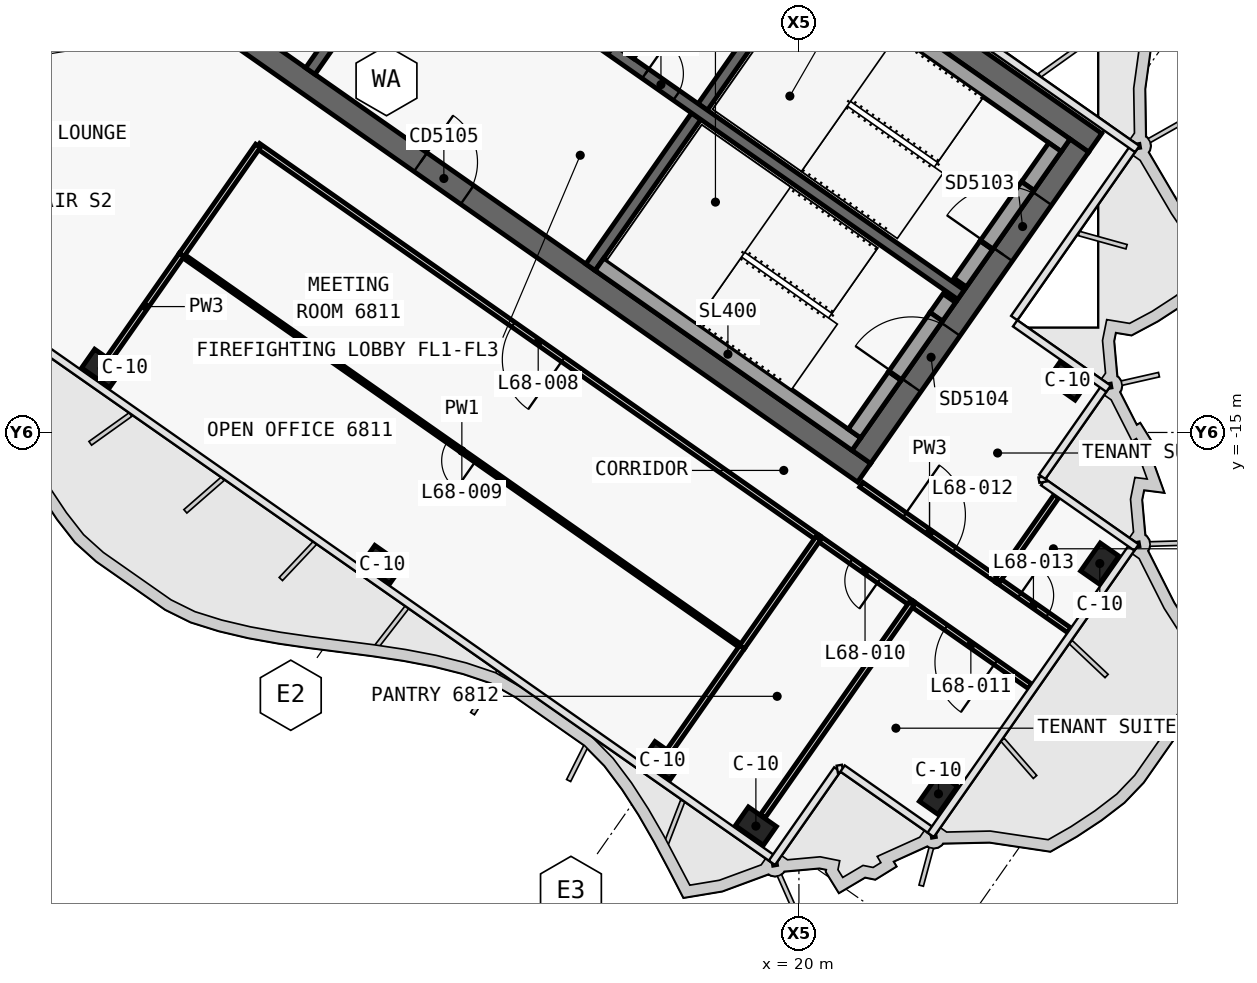
"""IFC4 building model, lengths in metres.
Left out: names, types, materials, properties, quantities, classifications, styles, units other than length and angle.
Written with IfcOpenShell. Run it as: python <this file> out.ifc"""

import sys

from ifc_helpers import new_model, si_unit, direction, frame, frame_2d, origin, origin_2d, place, context, subcontext, project, spatial, polyline, rectangle, outline, extrude, element, fill, save


model = new_model("IFC4")
c1 = context("Model", 3, precision=1e-05, world=origin(), true_north=direction((0.0, 1.0)))
c2 = subcontext(c1, "Body", "Model", "MODEL_VIEW")
j1 = project(units=[si_unit("LENGTHUNIT", "METRE"), si_unit("PLANEANGLEUNIT", "RADIAN")], contexts=[c1])
p1 = place(None, origin())
s1 = spatial("IfcSite", under=j1, at=p1, CompositionType="ELEMENT")
p2 = place(p1, origin())
s2 = spatial("IfcBuilding", under=s1, at=p2, CompositionType="ELEMENT")
p3 = place(p2, frame((0.0, 0.0, 287.8)))
s3 = spatial("IfcBuildingStorey", under=s2, at=p3, CompositionType="ELEMENT", Elevation=287.8)
p4 = place(p3, frame((0.028, 12.066, 0.0), z_axis=(0.0, 0.0, 1.0), x_axis=(0.819151382952, -0.573577380837, 0.0)))
e1 = element("IfcWall", 1, at=p4, inside=s3, PredefinedType="SHEAR", context=c2, shape_type="SweptSolid", body=[
    extrude(outline(polyline([(33.898, 0.3), (0.0, 0.3), (0.42, -0.3), (33.898, -0.3), (33.898, 0.3)])), origin(), (0.0, 0.0, 1.0), 3.9),
])
p5 = place(p3, frame((0.028, -0.874, 0.0), z_axis=(0.0, 0.0, 1.0), x_axis=(0.819150035022, -0.573579305871, 0.0)))
e2 = element("IfcWall", 2, at=p5, inside=s3, PredefinedType="SHEAR", context=c2, shape_type="SweptSolid", body=[
    extrude(outline(polyline([(26.476, 0.3), (0.0, 0.3), (0.42, -0.3), (26.476, -0.3), (26.476, 0.3)])), origin(), (0.0, 0.0, 1.0), 3.9),
])
p6 = place(p5, frame((1.026, 0.0, 0.0)))
e3 = element("IfcOpeningElement", 3, at=p6, cuts=e2, PredefinedType="OPENING", context=c2, shape_type="SweptSolid", body=[
    extrude(rectangle(XDim=1.5, YDim=2.1, at=frame_2d((0.75, 1.05))), frame((0.0, 0.31, 0.0), z_axis=(0.0, -1.0, 0.0), x_axis=(1.0, 0.0, 0.0)), (0.0, 0.0, 1.0), 0.62),
])
p7 = place(p5, frame((12.226, 0.0, 0.0)))
e4 = element("IfcOpeningElement", 4, at=p7, cuts=e2, PredefinedType="OPENING", context=c2, shape_type="SweptSolid", body=[
    extrude(rectangle(XDim=1.5, YDim=2.1, at=frame_2d((0.75, 1.05))), frame((0.0, 0.31, 0.0), z_axis=(0.0, -1.0, 0.0), x_axis=(1.0, 0.0, 0.0)), (0.0, 0.0, 1.0), 0.62),
])
p8 = place(p3, frame((21.642, -15.642, 0.0), z_axis=(0.0, 0.0, 1.0), x_axis=(0.573586866468, 0.819144740944, 0.0)))
e5 = element("IfcWall", 5, at=p8, inside=s3, PredefinedType="SHEAR", context=c2, shape_type="SweptSolid", body=[
    extrude(outline(polyline([(10.0, 0.3), (0.0, 0.3), (0.0, -0.3), (10.0, -0.3), (10.0, 0.3)])), origin(), (0.0, 0.0, 1.0), 3.9),
])
p9 = place(p8, frame((6.5, 0.0, 0.0)))
e6 = element("IfcOpeningElement", 6, at=p9, cuts=e5, PredefinedType="OPENING", context=c2, shape_type="SweptSolid", body=[
    extrude(rectangle(XDim=1.8, YDim=2.1, at=frame_2d((0.9, 1.05))), frame((0.0, 0.31, 0.0), z_axis=(0.0, -1.0, 0.0), x_axis=(1.0, 0.0, 0.0)), (0.0, 0.0, 1.0), 0.62),
])
p10 = place(p8, frame((2.3, 0.0, 0.0)))
e7 = element("IfcOpeningElement", 7, at=p10, cuts=e5, PredefinedType="OPENING", context=c2, shape_type="SweptSolid", body=[
    extrude(rectangle(XDim=1.8, YDim=2.1, at=frame_2d((0.9, 1.05))), frame((0.0, 0.31, 0.0), z_axis=(0.0, -1.0, 0.0), x_axis=(1.0, 0.0, 0.0)), (0.0, 0.0, 1.0), 0.62),
])
p11 = place(p3, frame((7.143, -5.49, 0.0), z_axis=(0.0, 0.0, 1.0), x_axis=(0.573617744349, 0.819123118565, 0.0)))
e8 = element("IfcWall", 8, at=p11, inside=s3, PredefinedType="SHEAR", context=c2, shape_type="SweptSolid", body=[
    extrude(outline(polyline([(0.0, 0.15), (0.0, -0.15), (4.85, -0.15), (4.85, 0.15), (0.0, 0.15)])), origin(), (0.0, 0.0, 1.0), 3.9),
])
p12 = place(p3, frame((14.515, -10.652, 0.0), z_axis=(0.0, 0.0, 1.0), x_axis=(0.573560315113, 0.819163332265, 0.0)))
e9 = element("IfcWall", 9, at=p12, inside=s3, PredefinedType="SHEAR", context=c2, shape_type="SweptSolid", body=[
    extrude(outline(polyline([(0.0, 0.15), (0.0, -0.15), (4.85, -0.15), (4.85, 0.15), (0.0, 0.15)])), origin(), (0.0, 0.0, 1.0), 3.9),
])
p13 = place(p3, frame((17.469, -6.433, 0.0), z_axis=(0.0, 0.0, 1.0), x_axis=(0.573594092424, 0.81913968109, 0.0)))
e10 = element("IfcWall", 10, at=p13, inside=s3, PredefinedType="SHEAR", context=c2, shape_type="SweptSolid", body=[
    extrude(outline(polyline([(4.85, -0.15), (4.85, 0.15), (0.0, 0.15), (0.0, -0.15), (4.85, -0.15)])), origin(), (0.0, 0.0, 1.0), 3.9),
])
p14 = place(p3, frame((2.638, 3.768, 0.0), z_axis=(0.0, 0.0, 1.0), x_axis=(0.819155014212, -0.573572194837, 0.0)))
e11 = element("IfcWall", 11, at=p14, inside=s3, PredefinedType="SHEAR", context=c2, shape_type="SweptSolid", body=[
    extrude(outline(polyline([(0.0, 0.15), (0.0, -0.15), (26.4, -0.15), (26.4, 0.15), (0.0, 0.15)])), origin(), (0.0, 0.0, 1.0), 3.9),
])
p15 = place(p14, frame((9.637, 0.0, 0.0)))
e12 = element("IfcOpeningElement", 12, at=p15, cuts=e11, PredefinedType="OPENING", context=c2, shape_type="SweptSolid", body=[
    extrude(rectangle(XDim=1.2, YDim=2.1, at=frame_2d((0.6, 1.05))), frame((0.0, 0.16, 0.0), z_axis=(0.0, -1.0, 0.0), x_axis=(1.0, 0.0, 0.0)), (0.0, 0.0, 1.0), 0.32),
])
p16 = place(p14, frame((11.812, 0.0, 0.0)))
e13 = element("IfcOpeningElement", 13, at=p16, cuts=e11, PredefinedType="OPENING", context=c2, shape_type="SweptSolid", body=[
    extrude(rectangle(XDim=1.2, YDim=2.1, at=frame_2d((0.6, 1.05))), frame((0.0, 0.16, 0.0), z_axis=(0.0, -1.0, 0.0), x_axis=(1.0, 0.0, 0.0)), (0.0, 0.0, 1.0), 0.32),
])
p17 = place(p14, frame((13.988, 0.0, 0.0)))
e14 = element("IfcOpeningElement", 14, at=p17, cuts=e11, PredefinedType="OPENING", context=c2, shape_type="SweptSolid", body=[
    extrude(rectangle(XDim=1.2, YDim=2.1, at=frame_2d((0.6, 1.05))), frame((0.0, 0.16, 0.0), z_axis=(0.0, -1.0, 0.0), x_axis=(1.0, 0.0, 0.0)), (0.0, 0.0, 1.0), 0.32),
])
p18 = place(p14, frame((16.262, 0.0, 0.0)))
e15 = element("IfcOpeningElement", 15, at=p18, cuts=e11, PredefinedType="OPENING", context=c2, shape_type="SweptSolid", body=[
    extrude(rectangle(XDim=1.0, YDim=2.1, at=frame_2d((0.5, 1.05))), frame((0.0, 0.16, 0.0), z_axis=(0.0, -1.0, 0.0), x_axis=(1.0, 0.0, 0.0)), (0.0, 0.0, 1.0), 0.32),
])
for number, where, z_axis, x_axis in (
    (16, (1.665, -13.313, 0.0), (0.0, 0.0, 1.0), (0.819, -0.574, 0.0)),
    (17, (9.038, -18.475, 0.0), (0.0, 0.0, 1.0), (0.819, -0.574, 0.0)),
    (18, (16.41, -23.637, 0.0), (0.0, 0.0, 1.0), (0.819, -0.574, 0.0)),
    (19, (18.867, -25.358, 0.0), (0.0, 0.0, 1.0), (0.819, -0.574, 0.0)),
    (20, (27.07, -13.644, 0.0), (0.0, 0.0, 1.0), (0.819, -0.574, 0.0)),
    (21, (23.672, -24.51, 0.0), (0.0, 0.0, 1.0), (0.574, 0.819, 0.0)),
    (22, (27.917, -18.449, 0.0), (0.0, 0.0, 1.0), (0.574, 0.819, 0.0)),
):
    element("IfcColumn", number, at=place(p3, frame(where, z_axis=z_axis, x_axis=x_axis)), inside=s3, PredefinedType="COLUMN", context=c2, shape_type="SweptSolid", body=[
        extrude(rectangle(XDim=0.9, YDim=0.6, at=origin_2d()), origin(), (0.0, 0.0, 1.0), 3.9),
    ])
p19 = place(p3, frame((15.565, -5.1, 0.0), z_axis=(0.0, 0.0, 1.0), x_axis=(0.573560315113, 0.819163332265, 0.0)))
e23 = element("IfcWall", 23, at=p19, inside=s3, PredefinedType="SOLIDWALL", context=c2, shape_type="SweptSolid", body=[
    extrude(rectangle(XDim=4.85, YDim=0.2, at=frame_2d((2.425, 0.0))), origin(), (0.0, 0.0, 1.0), 3.9),
])
p20 = place(p3, frame((20.259, -2.71, 0.0), z_axis=(0.0, 0.0, 1.0), x_axis=(0.81914849389, -0.573581506813, 0.0)))
e24 = element("IfcWall", 24, at=p20, inside=s3, PredefinedType="SOLIDWALL", context=c2, shape_type="SweptSolid", body=[
    extrude(rectangle(XDim=8.25, YDim=0.4, at=frame_2d((4.125, 0.0))), origin(), (0.0, 0.0, 1.0), 3.62),
])
p21 = place(p3, frame((24.244, -11.055, 0.0), z_axis=(0.0, 0.0, 1.0), x_axis=(0.573571582932, 0.819155442668, 0.0)))
e25 = element("IfcWall", 25, at=p21, inside=s3, PredefinedType="SOLIDWALL", context=c2, shape_type="SweptSolid", body=[
    extrude(rectangle(XDim=1.2, YDim=0.4, at=frame_2d((0.6, 0.0))), origin(), (0.0, 0.0, 1.0), 3.62),
])
p22 = place(p3, frame((26.022, -8.515, 0.0), z_axis=(0.0, 0.0, 1.0), x_axis=(0.573619628835, 0.819121798889, 0.0)))
e26 = element("IfcWall", 26, at=p22, inside=s3, PredefinedType="SOLIDWALL", context=c2, shape_type="SweptSolid", body=[
    extrude(rectangle(XDim=1.25, YDim=0.4, at=frame_2d((0.625, 0.0))), origin(), (0.0, 0.0, 1.0), 3.62),
])
p23 = place(p3, frame((24.932, -10.072, 2.15), z_axis=(0.0, 0.0, 1.0), x_axis=(0.573591692345, 0.819141361715, 0.0)))
e27 = element("IfcWall", 27, at=p23, inside=s3, PredefinedType="SOLIDWALL", context=c2, shape_type="SweptSolid", body=[
    extrude(rectangle(XDim=1.9, YDim=0.4, at=frame_2d((0.95, 0.0))), origin(), (0.0, 0.0, 1.0), 1.47),
])
p24 = place(p3, frame((14.753, -10.574, 0.0), z_axis=(0.0, 0.0, 1.0), x_axis=(0.819158229677, -0.573567602601, 0.0)))
e28 = element("IfcWall", 28, at=p24, inside=s3, PredefinedType="SOLIDWALL", context=c2, shape_type="SweptSolid", body=[
    extrude(rectangle(XDim=8.25, YDim=0.4, at=frame_2d((4.125, 0.0))), origin(), (0.0, 0.0, 1.0), 3.62),
])
p25 = place(p3, frame((21.462, -15.028, 0.0), z_axis=(0.0, 0.0, 1.0), x_axis=(0.573559770908, 0.819163713305, 0.0)))
e29 = element("IfcWall", 29, at=p25, inside=s3, PredefinedType="SOLIDWALL", context=c2, shape_type="SweptSolid", body=[
    extrude(rectangle(XDim=1.85, YDim=0.4, at=frame_2d((0.925, 0.0))), origin(), (0.0, 0.0, 1.0), 3.62),
])
p26 = place(p3, frame((23.613, -11.956, 0.0), z_axis=(0.0, 0.0, 1.0), x_axis=(0.573435029941, 0.819251039936, 0.0)))
e30 = element("IfcWall", 30, at=p26, inside=s3, PredefinedType="SOLIDWALL", context=c2, shape_type="SweptSolid", body=[
    extrude(rectangle(XDim=0.6, YDim=0.4, at=frame_2d((0.3, 0.0))), origin(), (0.0, 0.0, 1.0), 3.62),
])
p27 = place(p3, frame((22.523, -13.512, 2.15), z_axis=(0.0, 0.0, 1.0), x_axis=(0.573591692345, 0.819141361715, 0.0)))
e31 = element("IfcWall", 31, at=p27, inside=s3, PredefinedType="SOLIDWALL", context=c2, shape_type="SweptSolid", body=[
    extrude(rectangle(XDim=1.9, YDim=0.4, at=frame_2d((0.95, 0.0))), origin(), (0.0, 0.0, 1.0), 1.47),
])
p28 = place(p3, frame((21.642, -16.375, 0.0), z_axis=(0.0, 0.0, 1.0), x_axis=(0.819156008334, -0.573570775066, 0.0)))
e32 = element("IfcWall", 32, at=p28, inside=s3, PredefinedType="PARTITIONING", context=c2, shape_type="SweptSolid", body=[
    extrude(rectangle(XDim=4.382, YDim=0.15, at=frame_2d((2.191, 0.0))), origin(), (0.0, 0.0, 1.0), 3.05),
])
p29 = place(p28, frame((1.391, 0.0, 0.0)))
e33 = element("IfcOpeningElement", 33, at=p29, cuts=e32, PredefinedType="OPENING", context=c2, shape_type="SweptSolid", body=[
    extrude(rectangle(XDim=1.6, YDim=2.1, at=frame_2d((0.8, 1.05))), frame((0.0, 0.085, 0.0), z_axis=(0.0, -1.0, 0.0), x_axis=(1.0, 0.0, 0.0)), (0.0, 0.0, 1.0), 0.17),
])
p30 = place(p3, frame((25.228, -18.886, 0.0), z_axis=(0.0, 0.0, 1.0), x_axis=(0.819172126429, -0.573547755014, 0.0)))
e34 = element("IfcWall", 34, at=p30, inside=s3, PredefinedType="PARTITIONING", context=c2, shape_type="SweptSolid", body=[
    extrude(rectangle(XDim=2.302, YDim=0.15, at=frame_2d((1.151, 0.0))), origin(), (0.0, 0.0, 1.0), 3.0),
])
p31 = place(p30, frame((0.701, 0.0, 0.0)))
e35 = element("IfcOpeningElement", 35, at=p31, cuts=e34, PredefinedType="OPENING", context=c2, shape_type="SweptSolid", body=[
    extrude(rectangle(XDim=0.9, YDim=2.1, at=frame_2d((0.45, 1.05))), frame((0.0, 0.085, 0.0), z_axis=(0.0, -1.0, 0.0), x_axis=(1.0, 0.0, 0.0)), (0.0, 0.0, 1.0), 0.17),
])
p32 = place(p3, frame((20.513, -17.781, 0.0), z_axis=(0.0, 0.0, 1.0), x_axis=(-0.819153544995, 0.573574293115, 0.0)))
e36 = element("IfcWall", 36, at=p32, inside=s3, PredefinedType="PARTITIONING", context=c2, shape_type="SweptSolid", body=[
    extrude(rectangle(XDim=18.002, YDim=0.15, at=frame_2d((9.001, 0.0))), origin(), (0.0, 0.0, 1.0), 3.05),
])
p33 = place(p32, frame((8.201, 0.0, 0.0)))
e37 = element("IfcOpeningElement", 37, at=p33, cuts=e36, PredefinedType="OPENING", context=c2, shape_type="SweptSolid", body=[
    extrude(rectangle(XDim=1.6, YDim=2.1, at=frame_2d((0.8, 1.05))), frame((0.0, 0.085, 0.0), z_axis=(0.0, -1.0, 0.0), x_axis=(1.0, 0.0, 0.0)), (0.0, 0.0, 1.0), 0.17),
])
p34 = place(p3, frame((22.97, -19.502, 0.0), z_axis=(0.0, 0.0, 1.0), x_axis=(-0.819128818764, 0.573609604409, 0.0)))
e38 = element("IfcWall", 38, at=p34, inside=s3, PredefinedType="PARTITIONING", context=c2, shape_type="SweptSolid", body=[
    extrude(rectangle(XDim=3.004, YDim=0.15, at=frame_2d((1.502, 0.0))), origin(), (0.0, 0.0, 1.0), 3.05),
])
p35 = place(p34, frame((1.052, 0.0, 0.0)))
e39 = element("IfcOpeningElement", 39, at=p35, cuts=e38, PredefinedType="OPENING", context=c2, shape_type="SweptSolid", body=[
    extrude(rectangle(XDim=0.9, YDim=2.1, at=frame_2d((0.45, 1.05))), frame((0.0, 0.085, 0.0), z_axis=(0.0, -1.0, 0.0), x_axis=(1.0, 0.0, 0.0)), (0.0, 0.0, 1.0), 0.17),
])
p36 = place(p3, frame((26.081, -21.68, 0.0), z_axis=(0.0, 0.0, 1.0), x_axis=(-0.819168564183, 0.573552842775, 0.0)))
e40 = element("IfcWall", 40, at=p36, inside=s3, PredefinedType="PARTITIONING", context=c2, shape_type="SweptSolid", body=[
    extrude(rectangle(XDim=3.802, YDim=0.15, at=frame_2d((1.901, 0.0))), origin(), (0.0, 0.0, 1.0), 3.0),
])
p37 = place(p36, frame((1.101, 0.0, 0.0)))
e41 = element("IfcOpeningElement", 41, at=p37, cuts=e40, PredefinedType="OPENING", context=c2, shape_type="SweptSolid", body=[
    extrude(rectangle(XDim=1.6, YDim=2.1, at=frame_2d((0.8, 1.05))), frame((0.0, 0.085, 0.0), z_axis=(0.0, -1.0, 0.0), x_axis=(1.0, 0.0, 0.0)), (0.0, 0.0, 1.0), 0.17),
])
p38 = place(p3, frame((26.778, -16.675, 0.0), z_axis=(0.0, 0.0, 1.0), x_axis=(-0.573565509231, -0.819159695432, 0.0)))
e42 = element("IfcWall", 42, at=p38, inside=s3, PredefinedType="PARTITIONING", context=c2, shape_type="SweptSolid", body=[
    extrude(rectangle(XDim=2.7, YDim=0.15, at=frame_2d((1.35, 0.0))), origin(), (0.0, 0.0, 1.0), 3.62),
])
p39 = place(p3, frame((18.503, -20.648, 0.0), z_axis=(0.0, 0.0, 1.0), x_axis=(-0.819154173185, 0.573573395961, 0.0)))
e43 = element("IfcWall", 43, at=p39, inside=s3, PredefinedType="PARTITIONING", context=c2, shape_type="SweptSolid", body=[
    extrude(rectangle(XDim=18.0, YDim=0.1, at=frame_2d((9.0, 0.0))), origin(), (0.0, 0.0, 1.0), 3.05),
])
p40 = place(p39, frame((8.55, 0.0, 0.0)))
e44 = element("IfcOpeningElement", 44, at=p40, cuts=e43, PredefinedType="OPENING", context=c2, shape_type="SweptSolid", body=[
    extrude(rectangle(XDim=0.9, YDim=2.1, at=frame_2d((0.45, 1.05))), frame((0.0, 0.06, 0.0), z_axis=(0.0, -1.0, 0.0), x_axis=(1.0, 0.0, 0.0)), (0.0, 0.0, 1.0), 0.12),
])
p41 = place(p3, frame((18.503, -20.648, 0.0), z_axis=(0.0, 0.0, 1.0), x_axis=(-0.573560777794, -0.819163008306, 0.0)))
e45 = element("IfcWall", 45, at=p41, inside=s3, PredefinedType="PARTITIONING", context=c2, shape_type="SweptSolid", body=[
    extrude(rectangle(XDim=3.329, YDim=0.15, at=frame_2d((1.665, 0.0))), origin(), (0.0, 0.0, 1.0), 3.05),
])
p42 = place(p3, frame((1.849, -13.051, 0.0), z_axis=(0.0, 0.0, 1.0), x_axis=(0.573595235521, 0.819138880647, 0.0)))
e46 = element("IfcWall", 46, at=p42, inside=s3, PredefinedType="PARTITIONING", context=c2, shape_type="SweptSolid", body=[
    extrude(rectangle(XDim=3.329, YDim=0.15, at=frame_2d((1.665, 0.0))), origin(), (0.0, 0.0, 1.0), 3.05),
])
p43 = place(p3, frame((20.511, -17.78, 0.0), z_axis=(0.0, 0.0, 1.0), x_axis=(-0.573551294295, -0.819169648371, 0.0)))
e47 = element("IfcWall", 47, at=p43, inside=s3, PredefinedType="PARTITIONING", context=c2, shape_type="SweptSolid", body=[
    extrude(rectangle(XDim=3.5, YDim=0.15, at=frame_2d((1.75, 0.0))), origin(), (0.0, 0.0, 1.0), 3.05),
])
p44 = place(p3, frame((3.759, -10.323, 0.0), z_axis=(0.0, 0.0, 1.0), x_axis=(0.573598101901, 0.81913687348, 0.0)))
e48 = element("IfcWall", 48, at=p44, inside=s3, PredefinedType="PARTITIONING", context=c2, shape_type="SweptSolid", body=[
    extrude(rectangle(XDim=3.5, YDim=0.15, at=frame_2d((1.75, 0.0))), origin(), (0.0, 0.0, 1.0), 3.05),
])
p45 = place(p3, frame((22.969, -19.501, 0.0), z_axis=(0.0, 0.0, 1.0), x_axis=(-0.573577493031, -0.819151304393, 0.0)))
e49 = element("IfcWall", 49, at=p45, inside=s3, PredefinedType="PARTITIONING", context=c2, shape_type="SweptSolid", body=[
    extrude(rectangle(XDim=6.83, YDim=0.15, at=frame_2d((3.415, 0.0))), origin(), (0.0, 0.0, 1.0), 3.05),
])
p46 = place(p18, origin())
e50 = element("IfcDoor", 50, at=p46, inside=s3, OperationType="SINGLE_SWING_RIGHT", PredefinedType="DOOR", context=c2, shape_type="SweptSolid", body=[
    extrude(rectangle(XDim=1.0, YDim=2.1, at=frame_2d((0.5, 1.05))), frame((0.0, 0.025, 0.0), z_axis=(0.0, -1.0, 0.0), x_axis=(1.0, 0.0, 0.0)), (0.0, 0.0, 1.0), 0.05),
])
fill(e15, e50)
p47 = place(p7, origin())
e51 = element("IfcDoor", 51, at=p47, inside=s3, OperationType="DOUBLE_DOOR_SINGLE_SWING", PredefinedType="DOOR", context=c2, shape_type="SweptSolid", body=[
    extrude(rectangle(XDim=1.5, YDim=2.1, at=frame_2d((0.75, 1.05))), frame((0.0, 0.025, 0.0), z_axis=(0.0, -1.0, 0.0), x_axis=(1.0, 0.0, 0.0)), (0.0, 0.0, 1.0), 0.05),
])
fill(e4, e51)
p48 = place(p9, origin())
e52 = element("IfcDoor", 52, at=p48, inside=s3, OperationType="DOUBLE_DOOR_SINGLE_SWING", PredefinedType="DOOR", context=c2, shape_type="SweptSolid", body=[
    extrude(rectangle(XDim=1.8, YDim=2.1, at=frame_2d((0.9, 1.05))), frame((0.0, 0.025, 0.0), z_axis=(0.0, -1.0, 0.0), x_axis=(1.0, 0.0, 0.0)), (0.0, 0.0, 1.0), 0.05),
])
fill(e6, e52)
p49 = place(p10, origin())
e53 = element("IfcDoor", 53, at=p49, inside=s3, OperationType="DOUBLE_DOOR_SINGLE_SWING", PredefinedType="DOOR", context=c2, shape_type="SweptSolid", body=[
    extrude(rectangle(XDim=1.8, YDim=2.1, at=frame_2d((0.9, 1.05))), frame((0.0, 0.025, 0.0), z_axis=(0.0, -1.0, 0.0), x_axis=(1.0, 0.0, 0.0)), (0.0, 0.0, 1.0), 0.05),
])
fill(e7, e53)
p50 = place(p33, origin())
e54 = element("IfcDoor", 54, at=p50, inside=s3, OperationType="DOUBLE_DOOR_SINGLE_SWING", PredefinedType="DOOR", context=c2, shape_type="SweptSolid", body=[
    extrude(rectangle(XDim=1.6, YDim=2.1, at=frame_2d((0.8, 1.05))), frame((0.0, 0.025, 0.0), z_axis=(0.0, -1.0, 0.0), x_axis=(1.0, 0.0, 0.0)), (0.0, 0.0, 1.0), 0.05),
])
fill(e37, e54)
p51 = place(p40, origin())
e55 = element("IfcDoor", 55, at=p51, inside=s3, OperationType="SINGLE_SWING_LEFT", PredefinedType="DOOR", context=c2, shape_type="SweptSolid", body=[
    extrude(rectangle(XDim=0.9, YDim=2.1, at=frame_2d((0.45, 1.05))), frame((0.0, 0.025, 0.0), z_axis=(0.0, -1.0, 0.0), x_axis=(1.0, 0.0, 0.0)), (0.0, 0.0, 1.0), 0.05),
])
fill(e44, e55)
p52 = place(p35, origin())
e56 = element("IfcDoor", 56, at=p52, inside=s3, OperationType="SINGLE_SWING_LEFT", PredefinedType="DOOR", context=c2, shape_type="SweptSolid", body=[
    extrude(rectangle(XDim=0.9, YDim=2.1, at=frame_2d((0.45, 1.05))), frame((0.0, 0.025, 0.0), z_axis=(0.0, -1.0, 0.0), x_axis=(1.0, 0.0, 0.0)), (0.0, 0.0, 1.0), 0.05),
])
fill(e39, e56)
p53 = place(p37, origin())
e57 = element("IfcDoor", 57, at=p53, inside=s3, OperationType="DOUBLE_DOOR_SINGLE_SWING", PredefinedType="DOOR", context=c2, shape_type="SweptSolid", body=[
    extrude(rectangle(XDim=1.6, YDim=2.1, at=frame_2d((0.8, 1.05))), frame((0.0, 0.025, 0.0), z_axis=(0.0, -1.0, 0.0), x_axis=(1.0, 0.0, 0.0)), (0.0, 0.0, 1.0), 0.05),
])
fill(e41, e57)
p54 = place(p29, origin())
e58 = element("IfcDoor", 58, at=p54, inside=s3, OperationType="DOUBLE_DOOR_SINGLE_SWING", PredefinedType="DOOR", context=c2, shape_type="SweptSolid", body=[
    extrude(rectangle(XDim=1.6, YDim=2.1, at=frame_2d((0.8, 1.05))), frame((0.0, 0.025, 0.0), z_axis=(0.0, -1.0, 0.0), x_axis=(1.0, 0.0, 0.0)), (0.0, 0.0, 1.0), 0.05),
])
fill(e33, e58)
p55 = place(p31, origin())
e59 = element("IfcDoor", 59, at=p55, inside=s3, OperationType="SINGLE_SWING_LEFT", PredefinedType="DOOR", context=c2, shape_type="SweptSolid", body=[
    extrude(rectangle(XDim=0.9, YDim=2.1, at=frame_2d((0.45, 1.05))), frame((0.0, 0.025, 0.0), z_axis=(0.0, -1.0, 0.0), x_axis=(1.0, 0.0, 0.0)), (0.0, 0.0, 1.0), 0.05),
])
fill(e35, e59)
save(model, sys.argv[1])
